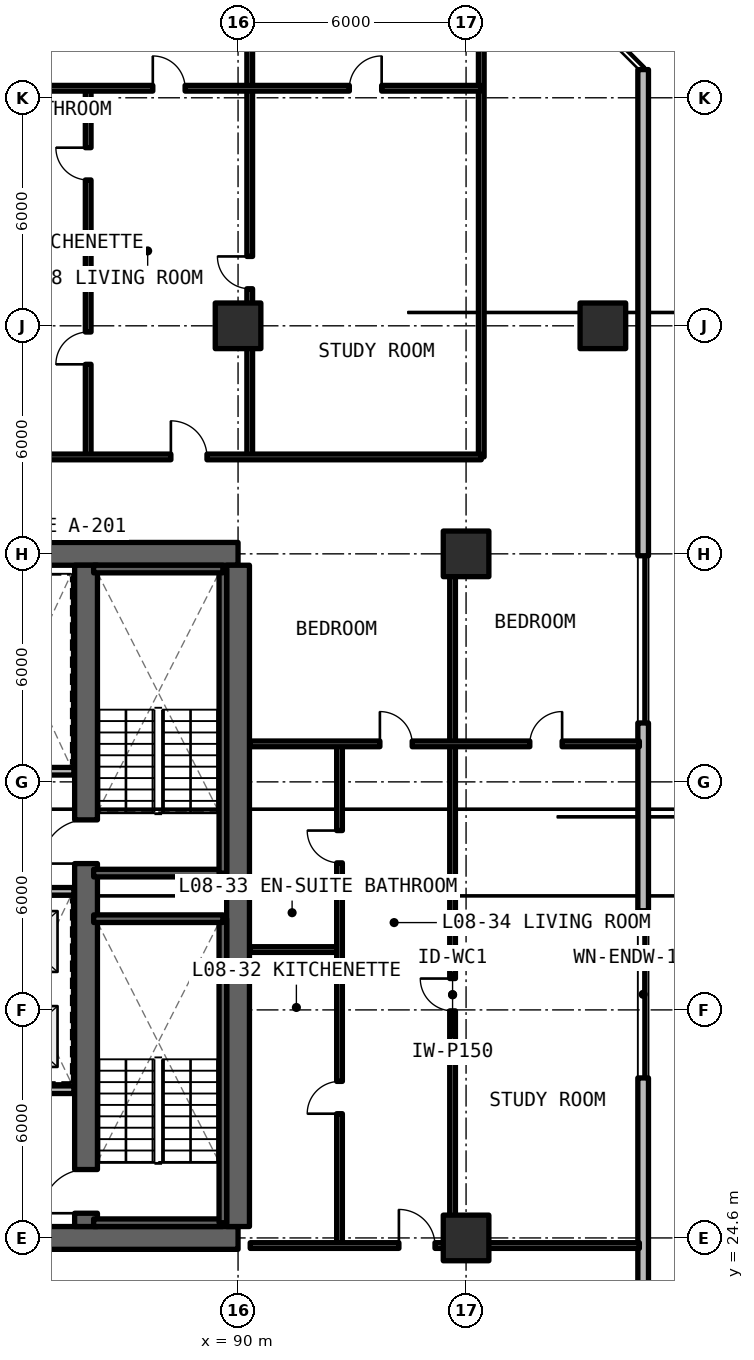
"""IFC4 building model, lengths in metres.
Left out: names, types, materials, properties, quantities, classifications, styles, units other than length and angle.
Written with IfcOpenShell. Run it as: python <this file> out.ifc"""

import sys

from ifc_helpers import new_model, si_unit, direction, frame, frame_2d, origin, origin_2d, place, context, subcontext, project, spatial, rectangle, extrude, element, fill, save


model = new_model("IFC4")
c1 = context("Model", 3, precision=1e-05, world=origin(), true_north=direction((0.0, 1.0)))
c2 = subcontext(c1, "Body", "Model", "MODEL_VIEW")
j1 = project(units=[si_unit("LENGTHUNIT", "METRE"), si_unit("PLANEANGLEUNIT", "RADIAN")], contexts=[c1])
p1 = place(None, origin())
s1 = spatial("IfcSite", under=j1, at=p1, CompositionType="ELEMENT")
p2 = place(p1, origin())
s2 = spatial("IfcBuilding", under=s1, at=p2, CompositionType="ELEMENT")
p3 = place(p2, frame((0.0, 0.0, 32.34)))
s3 = spatial("IfcBuildingStorey", under=s2, at=p3, CompositionType="ELEMENT", Elevation=32.34)
for number, where, z_axis, x_axis in (
    (1, (78.0, 24.6, 0.0), (0.0, 0.0, 1.0), (1.0, 0.0, 0.0)),
    (2, (90.0, 42.6, 0.0), (0.0, 0.0, 1.0), (-1.0, 0.0, 0.0)),
):
    element("IfcWall", number, at=place(p3, frame(where, z_axis=z_axis, x_axis=x_axis)), inside=s3, PredefinedType="SHEAR", context=c2, shape_type="SweptSolid", body=[
        extrude(rectangle(XDim=12.0, YDim=0.6, at=frame_2d((6.0, 0.0))), origin(), (0.0, 0.0, 1.0), 3.3),
    ])
p4 = place(p3, frame((90.0, 24.9, 0.0), z_axis=(0.0, 0.0, 1.0), x_axis=(0.0, 1.0, 0.0)))
e3 = element("IfcWall", 3, at=p4, inside=s3, PredefinedType="SHEAR", context=c2, shape_type="SweptSolid", body=[
    extrude(rectangle(XDim=17.4, YDim=0.6, at=frame_2d((8.7, 0.0))), origin(), (0.0, 0.0, 1.0), 3.3),
])
p5 = place(p3, frame((86.0, 24.9, 0.0), z_axis=(0.0, 0.0, 1.0), x_axis=(0.0, 1.0, 0.0)))
e4 = element("IfcWall", 4, at=p5, inside=s3, PredefinedType="SHEAR", context=c2, shape_type="SweptSolid", body=[
    extrude(rectangle(XDim=17.4, YDim=0.6, at=frame_2d((8.7, 0.0))), origin(), (0.0, 0.0, 1.0), 3.3),
])
p6 = place(p5, frame((0.35, 0.0, 0.0)))
e5 = element("IfcOpeningElement", 5, at=p6, cuts=e4, PredefinedType="OPENING", context=c2, shape_type="SweptSolid", body=[
    extrude(rectangle(XDim=1.15, YDim=2.15, at=frame_2d((0.575, 1.075))), frame((0.0, 0.31, 0.0), z_axis=(0.0, -1.0, 0.0), x_axis=(1.0, 0.0, 0.0)), (0.0, 0.0, 1.0), 0.62),
])
p7 = place(p5, frame((9.55, 0.0, 0.0)))
e6 = element("IfcOpeningElement", 6, at=p7, cuts=e4, PredefinedType="OPENING", context=c2, shape_type="SweptSolid", body=[
    extrude(rectangle(XDim=1.15, YDim=2.15, at=frame_2d((0.575, 1.075))), frame((0.0, 0.31, 0.0), z_axis=(0.0, -1.0, 0.0), x_axis=(1.0, 0.0, 0.0)), (0.0, 0.0, 1.0), 0.62),
])
for number, where, z_axis, x_axis in (
    (7, (96.0, 24.6, 0.0), (0.0, 0.0, 1.0), (1.0, 0.0, 0.0)),
    (8, (96.0, 42.6, 0.0), (0.0, 0.0, 1.0), (1.0, 0.0, 0.0)),
    (9, (90.0, 48.6, 0.0), (0.0, 0.0, 1.0), (1.0, 0.0, 0.0)),
    (10, (99.6, 48.6, 0.0), (0.0, 0.0, 1.0), (1.0, 0.0, 0.0)),
):
    element("IfcColumn", number, at=place(p3, frame(where, z_axis=z_axis, x_axis=x_axis)), inside=s3, PredefinedType="COLUMN", context=c2, shape_type="SweptSolid", body=[
        extrude(rectangle(XDim=1.2, YDim=1.2, at=origin_2d()), origin(), (0.0, 0.0, 1.0), 3.3),
    ])
p8 = place(p3, frame((100.66, 11.858, 0.0), z_axis=(0.0, 0.0, 1.0), x_axis=(0.0, 1.0, 0.0)))
e11 = element("IfcWall", 11, at=p8, inside=s3, PredefinedType="SOLIDWALL", context=c2, shape_type="SweptSolid", body=[
    extrude(rectangle(XDim=43.484, YDim=0.28, at=frame_2d((21.742, 0.0))), origin(), (0.0, 0.0, 1.0), 3.08),
])
p9 = place(p8, frame((3.442, 0.0, 0.0)))
e12 = element("IfcOpeningElement", 12, at=p9, cuts=e11, PredefinedType="OPENING", context=c2, shape_type="SweptSolid", body=[
    extrude(rectangle(XDim=1.1, YDim=2.15, at=frame_2d((0.55, 1.075))), frame((0.0, 0.15, 0.0), z_axis=(0.0, -1.0, 0.0), x_axis=(1.0, 0.0, 0.0)), (0.0, 0.0, 1.0), 0.3),
])
p10 = place(p8, frame((16.952, 0.0, 0.78)))
e13 = element("IfcOpeningElement", 13, at=p10, cuts=e11, PredefinedType="OPENING", context=c2, shape_type="SweptSolid", body=[
    extrude(rectangle(XDim=4.4, YDim=1.66, at=frame_2d((2.2, 0.83))), frame((0.0, 0.15, 0.0), z_axis=(0.0, -1.0, 0.0), x_axis=(1.0, 0.0, 0.0)), (0.0, 0.0, 1.0), 0.3),
])
p11 = place(p8, frame((26.292, 0.0, 0.78)))
e14 = element("IfcOpeningElement", 14, at=p11, cuts=e11, PredefinedType="OPENING", context=c2, shape_type="SweptSolid", body=[
    extrude(rectangle(XDim=4.4, YDim=1.66, at=frame_2d((2.2, 0.83))), frame((0.0, 0.15, 0.0), z_axis=(0.0, -1.0, 0.0), x_axis=(1.0, 0.0, 0.0)), (0.0, 0.0, 1.0), 0.3),
])
p12 = place(p3, frame((78.32, 28.5, 0.0), z_axis=(0.0, 0.0, 1.0), x_axis=(1.0, 0.0, 0.0)))
e15 = element("IfcWall", 15, at=p12, inside=s3, PredefinedType="SOLIDWALL", context=c2, shape_type="SweptSolid", body=[
    extrude(rectangle(XDim=7.36, YDim=0.2, at=frame_2d((3.68, 0.0))), origin(), (0.0, 0.0, 1.0), 2.35),
])
p13 = place(p12, frame((3.48, 0.0, 0.0)))
e16 = element("IfcOpeningElement", 16, at=p13, cuts=e15, PredefinedType="OPENING", context=c2, shape_type="SweptSolid", body=[
    extrude(rectangle(XDim=1.0, YDim=2.15, at=frame_2d((0.5, 1.075))), frame((0.0, 0.11, 0.0), z_axis=(0.0, -1.0, 0.0), x_axis=(1.0, 0.0, 0.0)), (0.0, 0.0, 1.0), 0.22),
])
for number, where, z_axis, x_axis in (
    (17, (83.2, 33.72, 0.0), (0.0, 0.0, 1.0), (1.0, 0.0, 0.0)),
    (18, (83.2, 36.88, 0.0), (0.0, 0.0, 1.0), (1.0, 0.0, 0.0)),
):
    element("IfcWall", number, at=place(p3, frame(where, z_axis=z_axis, x_axis=x_axis)), inside=s3, PredefinedType="SOLIDWALL", context=c2, shape_type="SweptSolid", body=[
        extrude(rectangle(XDim=2.48, YDim=0.2, at=frame_2d((1.24, 0.0))), origin(), (0.0, 0.0, 1.0), 2.35),
    ])
p14 = place(p3, frame((95.645, 24.4, 0.0), z_axis=(0.0, 0.0, 1.0), x_axis=(0.0, 1.0, 0.0)))
e19 = element("IfcWall", 19, at=p14, inside=s3, PredefinedType="PARTITIONING", context=c2, shape_type="SweptSolid", body=[
    extrude(rectangle(XDim=13.2, YDim=0.15, at=frame_2d((6.6, 0.0))), origin(), (0.0, 0.0, 1.0), 2.35),
])
p15 = place(p14, frame((6.175, 0.0, 0.0)))
e20 = element("IfcOpeningElement", 20, at=p15, cuts=e19, PredefinedType="OPENING", context=c2, shape_type="SweptSolid", body=[
    extrude(rectangle(XDim=0.85, YDim=2.1, at=frame_2d((0.425, 1.05))), frame((0.0, 0.085, 0.0), z_axis=(0.0, -1.0, 0.0), x_axis=(1.0, 0.0, 0.0)), (0.0, 0.0, 1.0), 0.17),
])
p16 = place(p3, frame((90.32, 32.188, 0.0), z_axis=(0.0, 0.0, 1.0), x_axis=(1.0, 0.0, 0.0)))
e21 = element("IfcWall", 21, at=p16, inside=s3, PredefinedType="PARTITIONING", context=c2, shape_type="SweptSolid", body=[
    extrude(rectangle(XDim=2.35, YDim=0.15, at=frame_2d((1.175, 0.0))), origin(), (0.0, 0.0, 1.0), 2.35),
])
p17 = place(p3, frame((92.67, 24.4, 0.0), z_axis=(0.0, 0.0, 1.0), x_axis=(0.0, 1.0, 0.0)))
e22 = element("IfcWall", 22, at=p17, inside=s3, PredefinedType="PARTITIONING", context=c2, shape_type="SweptSolid", body=[
    extrude(rectangle(XDim=13.2, YDim=0.15, at=frame_2d((6.6, 0.0))), origin(), (0.0, 0.0, 1.0), 2.35),
])
p18 = place(p17, frame((3.469, 0.0, 0.0)))
e23 = element("IfcOpeningElement", 23, at=p18, cuts=e22, PredefinedType="OPENING", context=c2, shape_type="SweptSolid", body=[
    extrude(rectangle(XDim=0.85, YDim=2.1, at=frame_2d((0.425, 1.05))), frame((0.0, 0.085, 0.0), z_axis=(0.0, -1.0, 0.0), x_axis=(1.0, 0.0, 0.0)), (0.0, 0.0, 1.0), 0.17),
])
p19 = place(p17, frame((10.069, 0.0, 0.0)))
e24 = element("IfcOpeningElement", 24, at=p19, cuts=e22, PredefinedType="OPENING", context=c2, shape_type="SweptSolid", body=[
    extrude(rectangle(XDim=0.85, YDim=2.1, at=frame_2d((0.425, 1.05))), frame((0.0, 0.085, 0.0), z_axis=(0.0, -1.0, 0.0), x_axis=(1.0, 0.0, 0.0)), (0.0, 0.0, 1.0), 0.17),
])
p20 = place(p3, frame((95.645, 37.6, 0.0), z_axis=(0.0, 0.0, 1.0), x_axis=(0.0, 1.0, 0.0)))
e25 = element("IfcWall", 25, at=p20, inside=s3, PredefinedType="PARTITIONING", context=c2, shape_type="SweptSolid", body=[
    extrude(rectangle(XDim=5.2, YDim=0.15, at=frame_2d((2.6, 0.0))), origin(), (0.0, 0.0, 1.0), 2.35),
])
p21 = place(p3, frame((90.32, 37.6, 0.0), z_axis=(0.0, 0.0, 1.0), x_axis=(1.0, 0.0, 0.0)))
e26 = element("IfcWall", 26, at=p21, inside=s3, PredefinedType="PARTITIONING", context=c2, shape_type="SweptSolid", body=[
    extrude(rectangle(XDim=10.24, YDim=0.15, at=frame_2d((5.12, 0.0))), origin(), (0.0, 0.0, 1.0), 2.35),
])
p22 = place(p21, frame((3.412, 0.0, 0.0)))
e27 = element("IfcOpeningElement", 27, at=p22, cuts=e26, PredefinedType="OPENING", context=c2, shape_type="SweptSolid", body=[
    extrude(rectangle(XDim=0.85, YDim=2.1, at=frame_2d((0.425, 1.05))), frame((0.0, 0.085, 0.0), z_axis=(0.0, -1.0, 0.0), x_axis=(1.0, 0.0, 0.0)), (0.0, 0.0, 1.0), 0.17),
])
p23 = place(p21, frame((7.357, 0.0, 0.0)))
e28 = element("IfcOpeningElement", 28, at=p23, cuts=e26, PredefinedType="OPENING", context=c2, shape_type="SweptSolid", body=[
    extrude(rectangle(XDim=0.85, YDim=2.1, at=frame_2d((0.425, 1.05))), frame((0.0, 0.085, 0.0), z_axis=(0.0, -1.0, 0.0), x_axis=(1.0, 0.0, 0.0)), (0.0, 0.0, 1.0), 0.17),
])
p24 = place(p3, frame((90.32, 24.4, 0.0), z_axis=(0.0, 0.0, 1.0), x_axis=(1.0, 0.0, 0.0)))
e29 = element("IfcWall", 29, at=p24, inside=s3, PredefinedType="SOLIDWALL", context=c2, shape_type="SweptSolid", body=[
    extrude(rectangle(XDim=10.24, YDim=0.15, at=frame_2d((5.12, 0.0))), origin(), (0.0, 0.0, 1.0), 2.295),
])
p25 = place(p24, frame((3.913, 0.0, 0.0)))
e30 = element("IfcOpeningElement", 30, at=p25, cuts=e29, PredefinedType="OPENING", context=c2, shape_type="SweptSolid", body=[
    extrude(rectangle(XDim=0.95, YDim=2.15, at=frame_2d((0.475, 1.075))), frame((0.0, 0.085, 0.0), z_axis=(0.0, -1.0, 0.0), x_axis=(1.0, 0.0, 0.0)), (0.0, 0.0, 1.0), 0.17),
])
p26 = place(p3, frame((96.4, 45.15, 0.0), z_axis=(0.0, 0.0, 1.0), x_axis=(0.0, 1.0, 0.0)))
e31 = element("IfcWall", 31, at=p26, inside=s3, PredefinedType="SOLIDWALL", context=c2, shape_type="SweptSolid", body=[
    extrude(rectangle(XDim=14.17, YDim=0.15, at=frame_2d((7.085, 0.0))), origin(), (0.0, 0.0, 1.0), 2.35),
])
p27 = place(p3, frame((90.307, 45.15, 0.0), z_axis=(0.0, 0.0, 1.0), x_axis=(0.0, 1.0, 0.0)))
e32 = element("IfcWall", 32, at=p27, inside=s3, PredefinedType="PARTITIONING", context=c2, shape_type="SweptSolid", body=[
    extrude(rectangle(XDim=9.701, YDim=0.15, at=frame_2d((4.851, 0.0))), origin(), (0.0, 0.0, 1.0), 2.35),
])
p28 = place(p27, frame((4.425, 0.0, 0.0)))
e33 = element("IfcOpeningElement", 33, at=p28, cuts=e32, PredefinedType="OPENING", context=c2, shape_type="SweptSolid", body=[
    extrude(rectangle(XDim=0.85, YDim=2.1, at=frame_2d((0.425, 1.05))), frame((0.0, 0.085, 0.0), z_axis=(0.0, -1.0, 0.0), x_axis=(1.0, 0.0, 0.0)), (0.0, 0.0, 1.0), 0.17),
])
p29 = place(p3, frame((83.706, 50.874, 0.0), z_axis=(0.0, 0.0, 1.0), x_axis=(1.0, 0.0, 0.0)))
e34 = element("IfcWall", 34, at=p29, inside=s3, PredefinedType="PARTITIONING", context=c2, shape_type="SweptSolid", body=[
    extrude(rectangle(XDim=2.35, YDim=0.15, at=frame_2d((1.175, 0.0))), origin(), (0.0, 0.0, 1.0), 2.35),
])
p30 = place(p3, frame((86.056, 45.15, 0.0), z_axis=(0.0, 0.0, 1.0), x_axis=(0.0, 1.0, 0.0)))
e35 = element("IfcWall", 35, at=p30, inside=s3, PredefinedType="PARTITIONING", context=c2, shape_type="SweptSolid", body=[
    extrude(rectangle(XDim=9.701, YDim=0.15, at=frame_2d((4.851, 0.0))), origin(), (0.0, 0.0, 1.0), 2.35),
])
p31 = place(p30, frame((2.437, 0.0, 0.0)))
e36 = element("IfcOpeningElement", 36, at=p31, cuts=e35, PredefinedType="OPENING", context=c2, shape_type="SweptSolid", body=[
    extrude(rectangle(XDim=0.85, YDim=2.1, at=frame_2d((0.425, 1.05))), frame((0.0, 0.085, 0.0), z_axis=(0.0, -1.0, 0.0), x_axis=(1.0, 0.0, 0.0)), (0.0, 0.0, 1.0), 0.17),
])
p32 = place(p30, frame((7.287, 0.0, 0.0)))
e37 = element("IfcOpeningElement", 37, at=p32, cuts=e35, PredefinedType="OPENING", context=c2, shape_type="SweptSolid", body=[
    extrude(rectangle(XDim=0.85, YDim=2.1, at=frame_2d((0.425, 1.05))), frame((0.0, 0.085, 0.0), z_axis=(0.0, -1.0, 0.0), x_axis=(1.0, 0.0, 0.0)), (0.0, 0.0, 1.0), 0.17),
])
p33 = place(p3, frame((90.307, 54.851, 0.0), z_axis=(0.0, 0.0, 1.0), x_axis=(0.0, 1.0, 0.0)))
e38 = element("IfcWall", 38, at=p33, inside=s3, PredefinedType="PARTITIONING", context=c2, shape_type="SweptSolid", body=[
    extrude(rectangle(XDim=4.469, YDim=0.15, at=frame_2d((2.235, 0.0))), origin(), (0.0, 0.0, 1.0), 2.35),
])
p34 = place(p3, frame((83.706, 54.851, 0.0), z_axis=(0.0, 0.0, 1.0), x_axis=(1.0, 0.0, 0.0)))
e39 = element("IfcWall", 39, at=p34, inside=s3, PredefinedType="PARTITIONING", context=c2, shape_type="SweptSolid", body=[
    extrude(rectangle(XDim=12.694, YDim=0.15, at=frame_2d((6.347, 0.0))), origin(), (0.0, 0.0, 1.0), 2.35),
])
p35 = place(p34, frame((4.05, 0.0, 0.0)))
e40 = element("IfcOpeningElement", 40, at=p35, cuts=e39, PredefinedType="OPENING", context=c2, shape_type="SweptSolid", body=[
    extrude(rectangle(XDim=0.85, YDim=2.1, at=frame_2d((0.425, 1.05))), frame((0.0, 0.085, 0.0), z_axis=(0.0, -1.0, 0.0), x_axis=(1.0, 0.0, 0.0)), (0.0, 0.0, 1.0), 0.17),
])
p36 = place(p34, frame((9.222, 0.0, 0.0)))
e41 = element("IfcOpeningElement", 41, at=p36, cuts=e39, PredefinedType="OPENING", context=c2, shape_type="SweptSolid", body=[
    extrude(rectangle(XDim=0.85, YDim=2.1, at=frame_2d((0.425, 1.05))), frame((0.0, 0.085, 0.0), z_axis=(0.0, -1.0, 0.0), x_axis=(1.0, 0.0, 0.0)), (0.0, 0.0, 1.0), 0.17),
])
p37 = place(p3, frame((83.706, 45.15, 0.0), z_axis=(0.0, 0.0, 1.0), x_axis=(1.0, 0.0, 0.0)))
e42 = element("IfcWall", 42, at=p37, inside=s3, PredefinedType="SOLIDWALL", context=c2, shape_type="SweptSolid", body=[
    extrude(rectangle(XDim=12.694, YDim=0.15, at=frame_2d((6.347, 0.0))), origin(), (0.0, 0.0, 1.0), 2.35),
])
p38 = place(p37, frame((4.526, 0.0, 0.0)))
e43 = element("IfcOpeningElement", 43, at=p38, cuts=e42, PredefinedType="OPENING", context=c2, shape_type="SweptSolid", body=[
    extrude(rectangle(XDim=0.95, YDim=2.15, at=frame_2d((0.475, 1.075))), frame((0.0, 0.085, 0.0), z_axis=(0.0, -1.0, 0.0), x_axis=(1.0, 0.0, 0.0)), (0.0, 0.0, 1.0), 0.17),
])
p39 = place(p3, frame((86.2, 25.0, 0.0), z_axis=(0.0, 0.0, 1.0), x_axis=(1.0, 0.0, 0.0)))
e44 = element("IfcWall", 44, at=p39, inside=s3, PredefinedType="SOLIDWALL", context=c2, shape_type="SweptSolid", body=[
    extrude(rectangle(XDim=3.4, YDim=0.2, at=frame_2d((1.7, 0.0))), origin(), (0.0, 0.0, 1.0), 3.3),
])
p40 = place(p3, frame((89.6, 25.0, 0.0), z_axis=(0.0, 0.0, 1.0), x_axis=(0.0, 1.0, 0.0)))
e45 = element("IfcWall", 45, at=p40, inside=s3, PredefinedType="SOLIDWALL", context=c2, shape_type="SweptSolid", body=[
    extrude(rectangle(XDim=8.0, YDim=0.2, at=frame_2d((4.0, 0.0))), origin(), (0.0, 0.0, 1.0), 3.3),
])
for number, where, z_axis, x_axis in (
    (46, (89.6, 33.0, 0.0), (0.0, 0.0, 1.0), (-1.0, 0.0, 0.0)),
    (47, (86.2, 34.2, 0.0), (0.0, 0.0, 1.0), (1.0, 0.0, 0.0)),
):
    element("IfcWall", number, at=place(p3, frame(where, z_axis=z_axis, x_axis=x_axis)), inside=s3, PredefinedType="SOLIDWALL", context=c2, shape_type="SweptSolid", body=[
        extrude(rectangle(XDim=3.4, YDim=0.2, at=frame_2d((1.7, 0.0))), origin(), (0.0, 0.0, 1.0), 3.3),
    ])
p41 = place(p3, frame((89.6, 34.2, 0.0), z_axis=(0.0, 0.0, 1.0), x_axis=(0.0, 1.0, 0.0)))
e48 = element("IfcWall", 48, at=p41, inside=s3, PredefinedType="SOLIDWALL", context=c2, shape_type="SweptSolid", body=[
    extrude(rectangle(XDim=8.0, YDim=0.2, at=frame_2d((4.0, 0.0))), origin(), (0.0, 0.0, 1.0), 3.3),
])
p42 = place(p3, frame((89.6, 42.2, 0.0), z_axis=(0.0, 0.0, 1.0), x_axis=(-1.0, 0.0, 0.0)))
e49 = element("IfcWall", 49, at=p42, inside=s3, PredefinedType="SOLIDWALL", context=c2, shape_type="SweptSolid", body=[
    extrude(rectangle(XDim=3.4, YDim=0.2, at=frame_2d((1.7, 0.0))), origin(), (0.0, 0.0, 1.0), 3.3),
])
p43 = place(p10, origin())
e50 = element("IfcWindow", 50, at=p43, inside=s3, PartitioningType="SINGLE_PANEL", PredefinedType="WINDOW", context=c2, shape_type="SweptSolid", body=[
    extrude(rectangle(XDim=4.4, YDim=1.66, at=frame_2d((2.2, 0.83))), frame((0.0, 0.03, 0.0), z_axis=(0.0, -1.0, 0.0), x_axis=(1.0, 0.0, 0.0)), (0.0, 0.0, 1.0), 0.06),
])
fill(e13, e50)
p44 = place(p11, origin())
e51 = element("IfcWindow", 51, at=p44, inside=s3, PartitioningType="SINGLE_PANEL", PredefinedType="WINDOW", context=c2, shape_type="SweptSolid", body=[
    extrude(rectangle(XDim=4.4, YDim=1.66, at=frame_2d((2.2, 0.83))), frame((0.0, 0.03, 0.0), z_axis=(0.0, -1.0, 0.0), x_axis=(1.0, 0.0, 0.0)), (0.0, 0.0, 1.0), 0.06),
])
fill(e14, e51)
p45 = place(p15, origin())
e52 = element("IfcDoor", 52, at=p45, inside=s3, OperationType="SINGLE_SWING_RIGHT", PredefinedType="DOOR", context=c2, shape_type="SweptSolid", body=[
    extrude(rectangle(XDim=0.85, YDim=2.1, at=frame_2d((0.425, 1.05))), frame((0.0, 0.025, 0.0), z_axis=(0.0, -1.0, 0.0), x_axis=(1.0, 0.0, 0.0)), (0.0, 0.0, 1.0), 0.05),
])
fill(e20, e52)
p46 = place(p18, origin())
e53 = element("IfcDoor", 53, at=p46, inside=s3, OperationType="SINGLE_SWING_LEFT", PredefinedType="DOOR", context=c2, shape_type="SweptSolid", body=[
    extrude(rectangle(XDim=0.85, YDim=2.1, at=frame_2d((0.425, 1.05))), frame((0.0, 0.025, 0.0), z_axis=(0.0, -1.0, 0.0), x_axis=(1.0, 0.0, 0.0)), (0.0, 0.0, 1.0), 0.05),
])
fill(e23, e53)
p47 = place(p19, origin())
e54 = element("IfcDoor", 54, at=p47, inside=s3, OperationType="SINGLE_SWING_RIGHT", PredefinedType="DOOR", context=c2, shape_type="SweptSolid", body=[
    extrude(rectangle(XDim=0.85, YDim=2.1, at=frame_2d((0.425, 1.05))), frame((0.0, 0.025, 0.0), z_axis=(0.0, -1.0, 0.0), x_axis=(1.0, 0.0, 0.0)), (0.0, 0.0, 1.0), 0.05),
])
fill(e24, e54)
p48 = place(p22, origin())
e55 = element("IfcDoor", 55, at=p48, inside=s3, OperationType="SINGLE_SWING_LEFT", PredefinedType="DOOR", context=c2, shape_type="SweptSolid", body=[
    extrude(rectangle(XDim=0.85, YDim=2.1, at=frame_2d((0.425, 1.05))), frame((0.0, 0.025, 0.0), z_axis=(0.0, -1.0, 0.0), x_axis=(1.0, 0.0, 0.0)), (0.0, 0.0, 1.0), 0.05),
])
fill(e27, e55)
p49 = place(p23, origin())
e56 = element("IfcDoor", 56, at=p49, inside=s3, OperationType="SINGLE_SWING_RIGHT", PredefinedType="DOOR", context=c2, shape_type="SweptSolid", body=[
    extrude(rectangle(XDim=0.85, YDim=2.1, at=frame_2d((0.425, 1.05))), frame((0.0, 0.025, 0.0), z_axis=(0.0, -1.0, 0.0), x_axis=(1.0, 0.0, 0.0)), (0.0, 0.0, 1.0), 0.05),
])
fill(e28, e56)
p50 = place(p25, origin())
e57 = element("IfcDoor", 57, at=p50, inside=s3, OperationType="SINGLE_SWING_LEFT", PredefinedType="DOOR", context=c2, shape_type="SweptSolid", body=[
    extrude(rectangle(XDim=0.95, YDim=2.15, at=frame_2d((0.475, 1.075))), frame((0.0, 0.025, 0.0), z_axis=(0.0, -1.0, 0.0), x_axis=(1.0, 0.0, 0.0)), (0.0, 0.0, 1.0), 0.05),
])
fill(e30, e57)
p51 = place(p28, origin())
e58 = element("IfcDoor", 58, at=p51, inside=s3, OperationType="SINGLE_SWING_RIGHT", PredefinedType="DOOR", context=c2, shape_type="SweptSolid", body=[
    extrude(rectangle(XDim=0.85, YDim=2.1, at=frame_2d((0.425, 1.05))), frame((0.0, 0.025, 0.0), z_axis=(0.0, -1.0, 0.0), x_axis=(1.0, 0.0, 0.0)), (0.0, 0.0, 1.0), 0.05),
])
fill(e33, e58)
p52 = place(p31, origin())
e59 = element("IfcDoor", 59, at=p52, inside=s3, OperationType="SINGLE_SWING_LEFT", PredefinedType="DOOR", context=c2, shape_type="SweptSolid", body=[
    extrude(rectangle(XDim=0.85, YDim=2.1, at=frame_2d((0.425, 1.05))), frame((0.0, 0.025, 0.0), z_axis=(0.0, -1.0, 0.0), x_axis=(1.0, 0.0, 0.0)), (0.0, 0.0, 1.0), 0.05),
])
fill(e36, e59)
p53 = place(p32, origin())
e60 = element("IfcDoor", 60, at=p53, inside=s3, OperationType="SINGLE_SWING_RIGHT", PredefinedType="DOOR", context=c2, shape_type="SweptSolid", body=[
    extrude(rectangle(XDim=0.85, YDim=2.1, at=frame_2d((0.425, 1.05))), frame((0.0, 0.025, 0.0), z_axis=(0.0, -1.0, 0.0), x_axis=(1.0, 0.0, 0.0)), (0.0, 0.0, 1.0), 0.05),
])
fill(e37, e60)
p54 = place(p35, origin())
e61 = element("IfcDoor", 61, at=p54, inside=s3, OperationType="SINGLE_SWING_LEFT", PredefinedType="DOOR", context=c2, shape_type="SweptSolid", body=[
    extrude(rectangle(XDim=0.85, YDim=2.1, at=frame_2d((0.425, 1.05))), frame((0.0, 0.025, 0.0), z_axis=(0.0, -1.0, 0.0), x_axis=(1.0, 0.0, 0.0)), (0.0, 0.0, 1.0), 0.05),
])
fill(e40, e61)
p55 = place(p36, origin())
e62 = element("IfcDoor", 62, at=p55, inside=s3, OperationType="SINGLE_SWING_RIGHT", PredefinedType="DOOR", context=c2, shape_type="SweptSolid", body=[
    extrude(rectangle(XDim=0.85, YDim=2.1, at=frame_2d((0.425, 1.05))), frame((0.0, 0.025, 0.0), z_axis=(0.0, -1.0, 0.0), x_axis=(1.0, 0.0, 0.0)), (0.0, 0.0, 1.0), 0.05),
])
fill(e41, e62)
p56 = place(p38, origin())
e63 = element("IfcDoor", 63, at=p56, inside=s3, OperationType="SINGLE_SWING_LEFT", PredefinedType="DOOR", context=c2, shape_type="SweptSolid", body=[
    extrude(rectangle(XDim=0.95, YDim=2.15, at=frame_2d((0.475, 1.075))), frame((0.0, 0.025, 0.0), z_axis=(0.0, -1.0, 0.0), x_axis=(1.0, 0.0, 0.0)), (0.0, 0.0, 1.0), 0.05),
])
fill(e43, e63)
p57 = place(p6, origin())
e64 = element("IfcDoor", 64, at=p57, inside=s3, OperationType="SINGLE_SWING_RIGHT", PredefinedType="DOOR", context=c2, shape_type="SweptSolid", body=[
    extrude(rectangle(XDim=1.15, YDim=2.15, at=frame_2d((0.575, 1.075))), frame((0.0, 0.025, 0.0), z_axis=(0.0, -1.0, 0.0), x_axis=(1.0, 0.0, 0.0)), (0.0, 0.0, 1.0), 0.05),
])
fill(e5, e64)
p58 = place(p7, origin())
e65 = element("IfcDoor", 65, at=p58, inside=s3, OperationType="SINGLE_SWING_LEFT", PredefinedType="DOOR", context=c2, shape_type="SweptSolid", body=[
    extrude(rectangle(XDim=1.15, YDim=2.15, at=frame_2d((0.575, 1.075))), frame((0.0, 0.025, 0.0), z_axis=(0.0, -1.0, 0.0), x_axis=(1.0, 0.0, 0.0)), (0.0, 0.0, 1.0), 0.05),
])
fill(e6, e65)
save(model, sys.argv[1])
